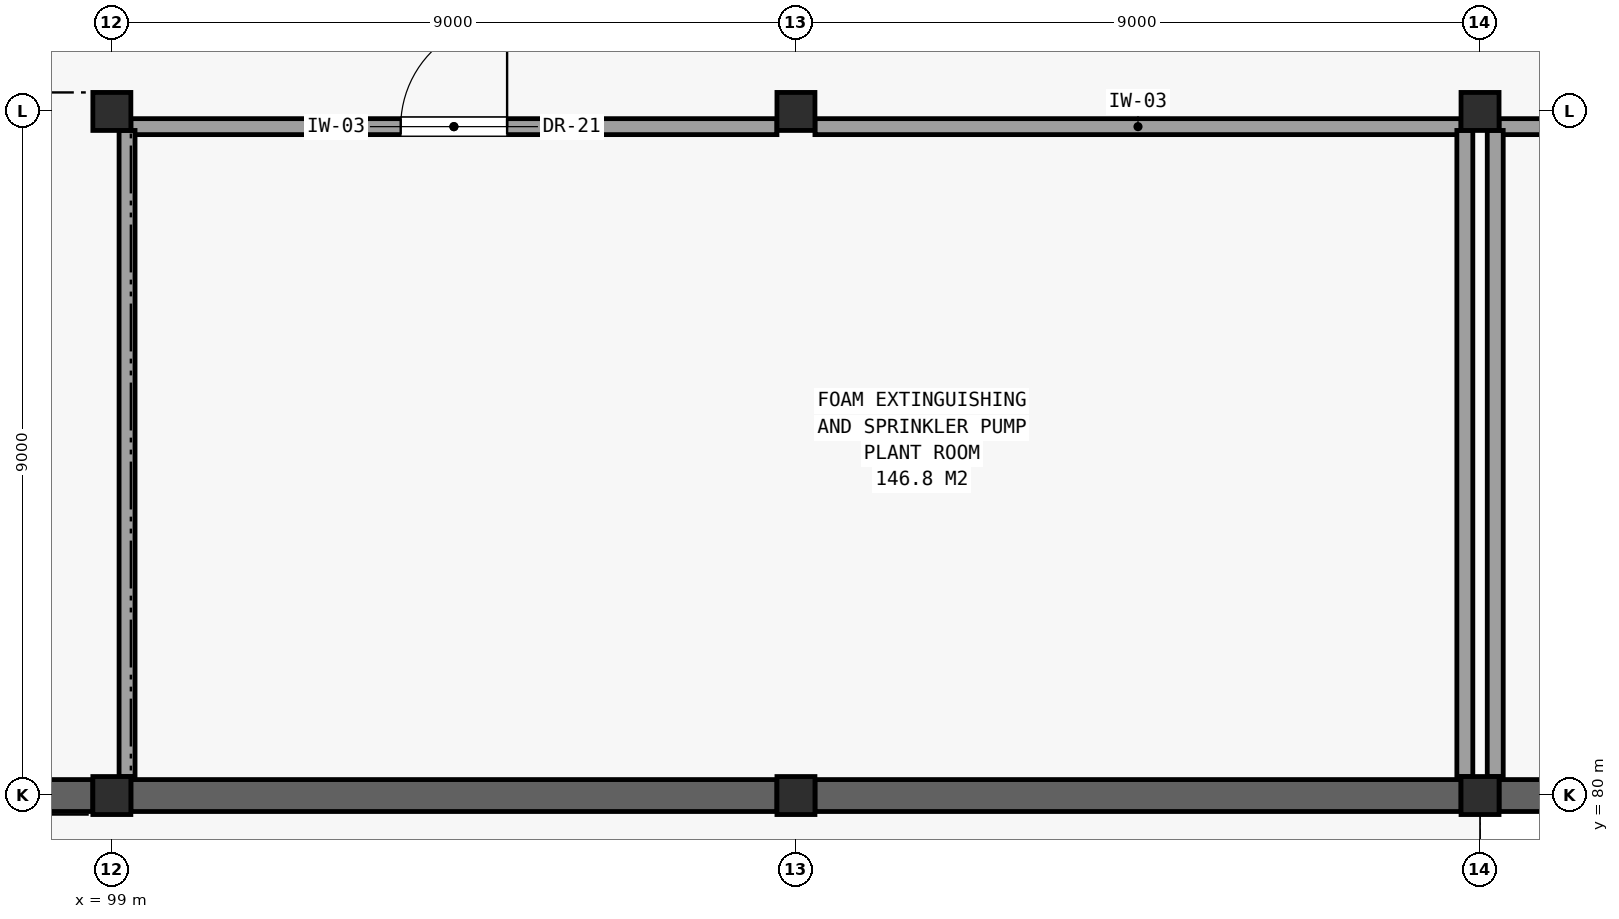
"""IFC4 building model, lengths in metres.
Left out: names, types, materials, properties, quantities, classifications, styles, units other than length and angle.
Written with IfcOpenShell. Run it as: python <this file> out.ifc"""

import sys

from ifc_helpers import new_model, si_unit, direction, frame, frame_2d, origin, origin_2d, place, context, subcontext, project, spatial, rectangle, hollow_rectangle, extrude, element, fill, save


model = new_model("IFC4")
c1 = context("Model", 3, precision=1e-05, world=origin(), true_north=direction((0.0, 1.0)))
c2 = subcontext(c1, "Body", "Model", "MODEL_VIEW")
j1 = project(units=[si_unit("LENGTHUNIT", "METRE"), si_unit("PLANEANGLEUNIT", "RADIAN")], contexts=[c1])
p1 = place(None, origin())
s1 = spatial("IfcSite", under=j1, at=p1, CompositionType="ELEMENT")
p2 = place(p1, origin())
s2 = spatial("IfcBuilding", under=s1, at=p2, CompositionType="ELEMENT")
p3 = place(p2, frame((0.0, 0.0, -4.8)))
s3 = spatial("IfcBuildingStorey", under=s2, at=p3, CompositionType="ELEMENT", Elevation=-4.8)
for number, where, z_axis, x_axis in (
    (1, (99.0, 80.0, 0.0), (0.0, 0.0, 1.0), (1.0, 0.0, 0.0)),
    (2, (99.0, 89.0, 0.0), (0.0, 0.0, 1.0), (1.0, 0.0, 0.0)),
    (3, (108.0, 80.0, 0.0), (0.0, 0.0, 1.0), (1.0, 0.0, 0.0)),
    (4, (108.0, 89.0, 0.0), (0.0, 0.0, 1.0), (1.0, 0.0, 0.0)),
    (5, (117.0, 80.0, 0.0), (0.0, 0.0, 1.0), (1.0, 0.0, 0.0)),
    (6, (117.0, 89.0, 0.0), (0.0, 0.0, 1.0), (1.0, 0.0, 0.0)),
):
    element("IfcColumn", number, at=place(p3, frame(where, z_axis=z_axis, x_axis=x_axis)), inside=s3, PredefinedType="COLUMN", context=c2, shape_type="SweptSolid", body=[
        extrude(hollow_rectangle(XDim=0.5, YDim=0.5, WallThickness=0.025, at=origin_2d()), origin(), (0.0, 0.0, 1.0), 4.8),
    ])
for number, where, z_axis, x_axis in (
    (7, (90.25, 80.0, 0.0), (0.0, 0.0, 1.0), (1.0, 0.0, 0.0)),
    (8, (99.25, 80.0, 0.0), (0.0, 0.0, 1.0), (1.0, 0.0, 0.0)),
    (9, (108.25, 80.0, 0.0), (0.0, 0.0, 1.0), (1.0, 0.0, 0.0)),
    (10, (117.25, 80.0, 0.0), (0.0, 0.0, 1.0), (1.0, 0.0, 0.0)),
):
    element("IfcWall", number, at=place(p3, frame(where, z_axis=z_axis, x_axis=x_axis)), inside=s3, PredefinedType="USERDEFINED", context=c2, shape_type="SweptSolid", body=[
        extrude(rectangle(XDim=8.5, YDim=0.42, at=frame_2d((4.25, 0.0))), origin(), (0.0, 0.0, 1.0), 4.13),
    ])
p4 = place(p3, frame((99.25, 88.8, 0.0), z_axis=(0.0, 0.0, 1.0), x_axis=(1.0, 0.0, 0.0)))
e11 = element("IfcWall", 11, at=p4, inside=s3, PredefinedType="PARTITIONING", context=c2, shape_type="SweptSolid", body=[
    extrude(rectangle(XDim=8.5, YDim=0.21, at=frame_2d((4.25, 0.0))), origin(), (0.0, 0.0, 1.0), 3.77),
])
p5 = place(p4, frame((3.55, 0.0, 0.0)))
e12 = element("IfcOpeningElement", 12, at=p5, cuts=e11, PredefinedType="OPENING", context=c2, shape_type="SweptSolid", body=[
    extrude(rectangle(XDim=1.4, YDim=2.2, at=frame_2d((0.7, 1.1))), frame((0.0, 0.116, 0.0), z_axis=(0.0, -1.0, 0.0), x_axis=(1.0, 0.0, 0.0)), (0.0, 0.0, 1.0), 0.232),
])
for number, where, z_axis, x_axis in (
    (13, (108.25, 88.8, 0.0), (0.0, 0.0, 1.0), (1.0, 0.0, 0.0)),
    (14, (99.2, 80.25, 0.0), (0.0, 0.0, 1.0), (0.0, 1.0, 0.0)),
    (15, (116.8, 80.25, 0.0), (0.0, 0.0, 1.0), (0.0, 1.0, 0.0)),
):
    element("IfcWall", number, at=place(p3, frame(where, z_axis=z_axis, x_axis=x_axis)), inside=s3, PredefinedType="PARTITIONING", context=c2, shape_type="SweptSolid", body=[
        extrude(rectangle(XDim=8.5, YDim=0.21, at=frame_2d((4.25, 0.0))), origin(), (0.0, 0.0, 1.0), 3.77),
    ])
p6 = place(p3, frame((117.25, 88.8, 0.0), z_axis=(0.0, 0.0, 1.0), x_axis=(1.0, 0.0, 0.0)))
e16 = element("IfcWall", 16, at=p6, inside=s3, PredefinedType="PARTITIONING", context=c2, shape_type="SweptSolid", body=[
    extrude(rectangle(XDim=8.5, YDim=0.21, at=frame_2d((4.25, 0.0))), origin(), (0.0, 0.0, 1.0), 3.77),
])
p7 = place(p6, frame((3.7, 0.0, 0.0)))
e17 = element("IfcOpeningElement", 17, at=p7, cuts=e16, PredefinedType="OPENING", context=c2, shape_type="SweptSolid", body=[
    extrude(rectangle(XDim=1.1, YDim=2.15, at=frame_2d((0.55, 1.075))), frame((0.0, 0.116, 0.0), z_axis=(0.0, -1.0, 0.0), x_axis=(1.0, 0.0, 0.0)), (0.0, 0.0, 1.0), 0.232),
])
p8 = place(p3, frame((117.2, 80.25, 0.0), z_axis=(0.0, 0.0, 1.0), x_axis=(0.0, 1.0, 0.0)))
e18 = element("IfcWall", 18, at=p8, inside=s3, PredefinedType="PARTITIONING", context=c2, shape_type="SweptSolid", body=[
    extrude(rectangle(XDim=8.5, YDim=0.21, at=frame_2d((4.25, 0.0))), origin(), (0.0, 0.0, 1.0), 3.77),
])
p9 = place(p5, origin())
e19 = element("IfcDoor", 19, at=p9, inside=s3, OperationType="SINGLE_SWING_RIGHT", PredefinedType="DOOR", context=c2, shape_type="SweptSolid", body=[
    extrude(rectangle(XDim=1.4, YDim=2.2, at=frame_2d((0.7, 1.1))), frame((0.0, 0.025, 0.0), z_axis=(0.0, -1.0, 0.0), x_axis=(1.0, 0.0, 0.0)), (0.0, 0.0, 1.0), 0.05),
])
fill(e12, e19)
save(model, sys.argv[1])
